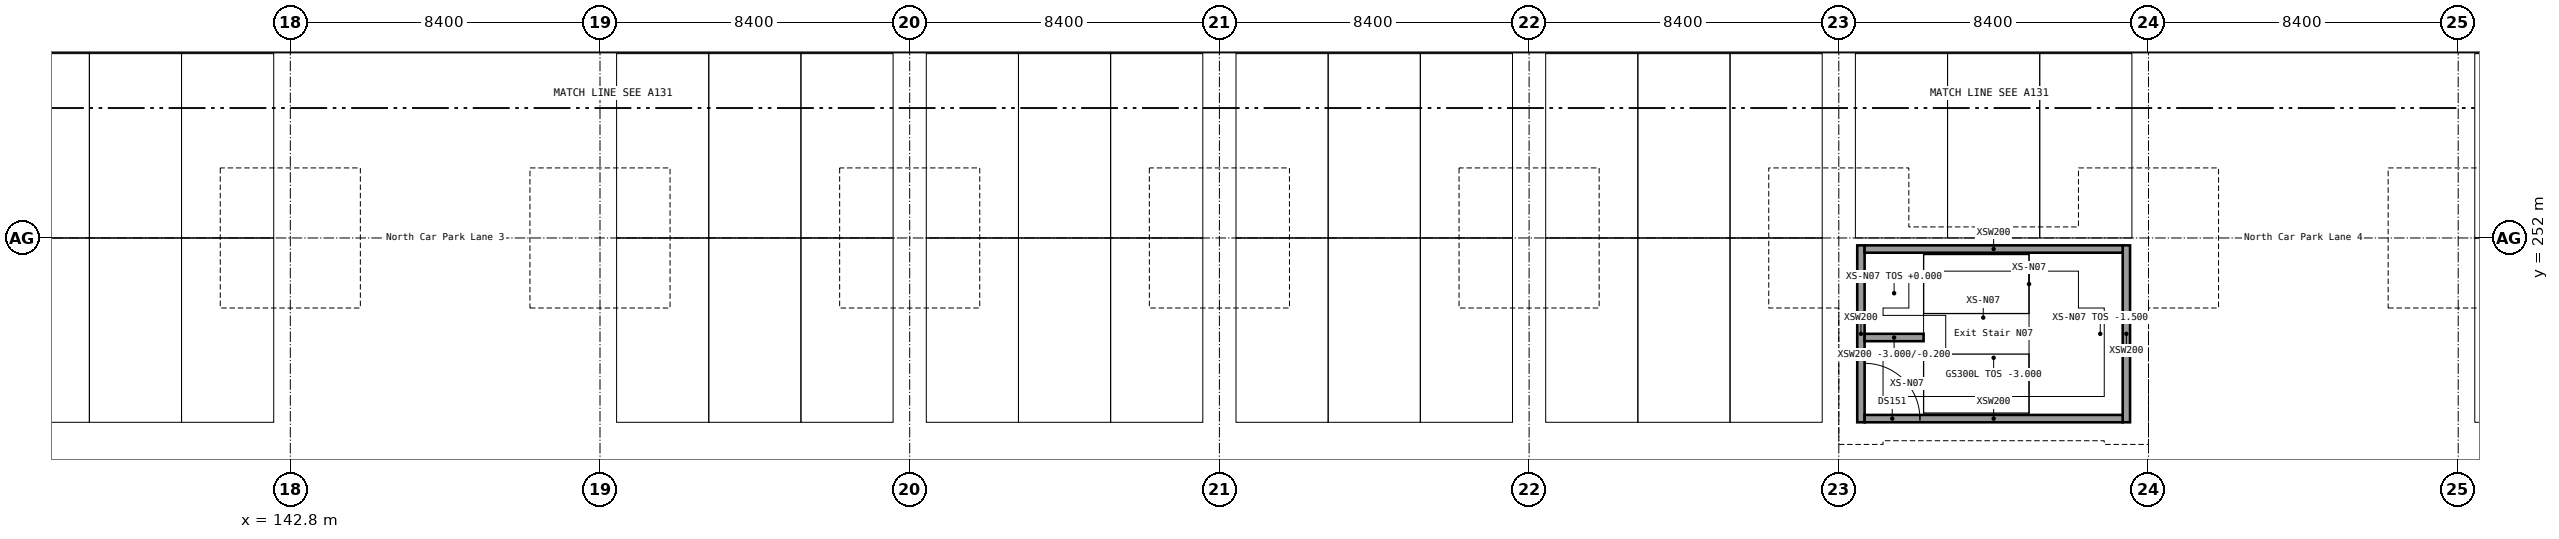
"""IFC4 building model, lengths in metres.
Left out: names, types, materials, properties, quantities, classifications, styles, units other than length and angle.
Written with IfcOpenShell. Run it as: python <this file> out.ifc"""

import sys

from ifc_helpers import new_model, si_unit, direction, frame, frame_2d, origin, origin_2d, place, context, subcontext, project, spatial, rectangle, extrude, element, fill, save


model = new_model("IFC4")
c1 = context("Model", 3, precision=1e-05, world=origin(), true_north=direction((0.0, 1.0)))
c2 = subcontext(c1, "Body", "Model", "MODEL_VIEW")
j1 = project(units=[si_unit("LENGTHUNIT", "METRE"), si_unit("PLANEANGLEUNIT", "RADIAN")], contexts=[c1])
p1 = place(None, origin())
s1 = spatial("IfcSite", under=j1, at=p1, CompositionType="ELEMENT")
p2 = place(p1, origin())
s2 = spatial("IfcBuilding", under=s1, at=p2, CompositionType="ELEMENT")
p3 = place(p2, frame((0.0, 0.0, -3.0)))
s3 = spatial("IfcBuildingStorey", under=s2, at=p3, CompositionType="ELEMENT", Elevation=-3.0)
for number, where, z_axis, x_axis in (
    (1, (185.4, 247.0, 0.0), (0.0, 0.0, 1.0), (0.0, 1.0, 0.0)),
    (2, (192.6, 247.0, 0.0), (0.0, 0.0, 1.0), (0.0, 1.0, 0.0)),
):
    element("IfcWall", number, at=place(p3, frame(where, z_axis=z_axis, x_axis=x_axis)), inside=s3, PredefinedType="SOLIDWALL", context=c2, shape_type="SweptSolid", body=[
        extrude(rectangle(XDim=4.8, YDim=0.2, at=frame_2d((2.4, 0.0))), origin(), (0.0, 0.0, 1.0), 3.0),
    ])
p4 = place(p3, frame((185.5, 247.1, 0.0), z_axis=(0.0, 0.0, 1.0), x_axis=(1.0, 0.0, 0.0)))
e3 = element("IfcWall", 3, at=p4, inside=s3, PredefinedType="SOLIDWALL", context=c2, shape_type="SweptSolid", body=[
    extrude(rectangle(XDim=7.0, YDim=0.2, at=frame_2d((3.5, 0.0))), origin(), (0.0, 0.0, 1.0), 3.0),
])
p5 = place(p4, origin())
e4 = element("IfcOpeningElement", 4, at=p5, cuts=e3, PredefinedType="OPENING", context=c2, shape_type="SweptSolid", body=[
    extrude(rectangle(XDim=1.5, YDim=2.1, at=frame_2d((0.75, 1.05))), frame((0.0, 0.1, 0.0), z_axis=(0.0, -1.0, 0.0), x_axis=(1.0, 0.0, 0.0)), (0.0, 0.0, 1.0), 0.2),
])
p6 = place(p3, frame((185.5, 251.7, 0.0), z_axis=(0.0, 0.0, 1.0), x_axis=(1.0, 0.0, 0.0)))
e5 = element("IfcWall", 5, at=p6, inside=s3, PredefinedType="SOLIDWALL", context=c2, shape_type="SweptSolid", body=[
    extrude(rectangle(XDim=7.0, YDim=0.2, at=frame_2d((3.5, 0.0))), origin(), (0.0, 0.0, 1.0), 3.0),
])
p7 = place(p3, frame((185.5, 249.3, 0.0), z_axis=(0.0, 0.0, 1.0), x_axis=(1.0, 0.0, 0.0)))
e6 = element("IfcWall", 6, at=p7, inside=s3, PredefinedType="SOLIDWALL", context=c2, shape_type="SweptSolid", body=[
    extrude(rectangle(XDim=1.6, YDim=0.2, at=frame_2d((0.8, 0.0))), origin(), (0.0, 0.0, 1.0), 2.8),
])
for number, where, z_axis, x_axis in (
    (7, (142.8, 252.0, 0.0), (0.0, 0.0, 1.0), (1.0, 0.0, 0.0)),
    (8, (151.2, 252.0, 0.0), (0.0, 0.0, 1.0), (1.0, 0.0, 0.0)),
    (9, (159.6, 252.0, 0.0), (0.0, 0.0, 1.0), (1.0, 0.0, 0.0)),
    (10, (168.0, 252.0, 0.0), (0.0, 0.0, 1.0), (1.0, 0.0, 0.0)),
    (11, (176.4, 252.0, 0.0), (0.0, 0.0, 1.0), (1.0, 0.0, 0.0)),
    (12, (184.8, 252.0, 0.0), (0.0, 0.0, 1.0), (1.0, 0.0, 0.0)),
    (13, (193.2, 252.0, 0.0), (0.0, 0.0, 1.0), (1.0, 0.0, 0.0)),
    (14, (201.6, 252.0, 0.0), (0.0, 0.0, 1.0), (1.0, 0.0, 0.0)),
):
    element("IfcColumn", number, at=place(p3, frame(where, z_axis=z_axis, x_axis=x_axis)), inside=s3, PredefinedType="COLUMN", context=c2, shape_type="SweptSolid", body=[
        extrude(rectangle(XDim=0.8, YDim=0.8, at=origin_2d()), origin(), (0.0, 0.0, 1.0), 2.4),
    ])
p8 = place(p5, origin())
e15 = element("IfcDoor", 15, at=p8, inside=s3, OperationType="SINGLE_SWING_LEFT", PredefinedType="DOOR", context=c2, shape_type="SweptSolid", body=[
    extrude(rectangle(XDim=1.5, YDim=2.1, at=frame_2d((0.75, 1.05))), frame((0.0, 0.025, 0.0), z_axis=(0.0, -1.0, 0.0), x_axis=(1.0, 0.0, 0.0)), (0.0, 0.0, 1.0), 0.05),
])
fill(e4, e15)
save(model, sys.argv[1])
